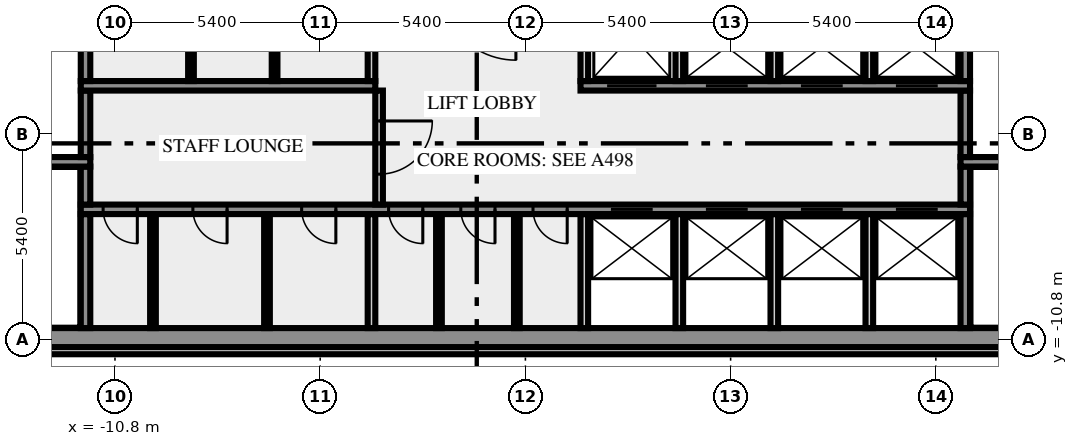
"""IFC4 building model, lengths in metres.
Left out: names, types, materials, properties, quantities, classifications, styles, units other than length and angle.
Written with IfcOpenShell. Run it as: python <this file> out.ifc"""

import sys

from ifc_helpers import new_model, si_unit, direction, frame, frame_2d, origin, place, context, subcontext, project, spatial, rectangle, extrude, element, fill, save


model = new_model("IFC4")
c1 = context("Model", 3, precision=1e-05, world=origin(), true_north=direction((0.0, 1.0)))
c2 = subcontext(c1, "Body", "Model", "MODEL_VIEW")
j1 = project(units=[si_unit("LENGTHUNIT", "METRE"), si_unit("PLANEANGLEUNIT", "RADIAN")], contexts=[c1])
p1 = place(None, origin())
s1 = spatial("IfcSite", under=j1, at=p1, CompositionType="ELEMENT")
p2 = place(p1, origin())
s2 = spatial("IfcBuilding", under=s1, at=p2, CompositionType="ELEMENT")
p3 = place(p2, frame((0.0, 0.0, 226.0)))
s3 = spatial("IfcBuildingStorey", under=s2, at=p3, CompositionType="ELEMENT", Elevation=226.0)
p4 = place(p3, frame((-17.444, -11.088, 0.0), z_axis=(0.0, 0.0, 1.0), x_axis=(1.0, 0.0, 0.0)))
e1 = element("IfcWall", 1, at=p4, inside=s3, PredefinedType="SOLIDWALL", context=c2, shape_type="SweptSolid", body=[
    extrude(rectangle(XDim=34.888, YDim=0.2, at=frame_2d((17.444, 0.0))), origin(), (0.0, 0.0, 1.0), 3.65),
])
p5 = place(p3, frame((-20.0, -10.75, 0.0), z_axis=(0.0, 0.0, 1.0), x_axis=(1.0, 0.0, 0.0)))
e2 = element("IfcWall", 2, at=p5, inside=s3, PredefinedType="SHEAR", context=c2, shape_type="SweptSolid", body=[
    extrude(rectangle(XDim=40.0, YDim=0.5, at=frame_2d((20.0, 0.0))), origin(), (0.0, 0.0, 1.0), 3.65),
])
p6 = place(p5, frame((0.8, 0.0, 1.0)))
e3 = element("IfcOpeningElement", 3, at=p6, cuts=e2, PredefinedType="OPENING", context=c2, shape_type="SweptSolid", body=[
    extrude(rectangle(XDim=1.2, YDim=1.2, at=frame_2d((0.6, 0.6))), frame((0.0, 0.26, 0.0), z_axis=(0.0, -1.0, 0.0), x_axis=(1.0, 0.0, 0.0)), (0.0, 0.0, 1.0), 0.52),
])
p7 = place(p5, frame((38.0, 0.0, 1.0)))
e4 = element("IfcOpeningElement", 4, at=p7, cuts=e2, PredefinedType="OPENING", context=c2, shape_type="SweptSolid", body=[
    extrude(rectangle(XDim=1.2, YDim=1.2, at=frame_2d((0.6, 0.6))), frame((0.0, 0.26, 0.0), z_axis=(0.0, -1.0, 0.0), x_axis=(1.0, 0.0, 0.0)), (0.0, 0.0, 1.0), 0.52),
])
p8 = place(p3, frame((-11.575, -10.5, 0.0), z_axis=(0.0, 0.0, 1.0), x_axis=(0.0, 1.0, 0.0)))
e5 = element("IfcWall", 5, at=p8, inside=s3, PredefinedType="SHEAR", context=c2, shape_type="SweptSolid", body=[
    extrude(rectangle(XDim=3.0, YDim=0.25, at=frame_2d((1.5, 0.0))), origin(), (0.0, 0.0, 1.0), 3.65),
])
for number, where, z_axis, x_axis in (
    (6, (-9.8, -10.5, 0.0), (0.0, 0.0, 1.0), (0.0, 1.0, 0.0)),
    (7, (-6.8, -10.5, 0.0), (0.0, 0.0, 1.0), (0.0, 1.0, 0.0)),
):
    element("IfcWall", number, at=place(p3, frame(where, z_axis=z_axis, x_axis=x_axis)), inside=s3, PredefinedType="PARTITIONING", context=c2, shape_type="SweptSolid", body=[
        extrude(rectangle(XDim=3.0, YDim=0.15, at=frame_2d((1.5, 0.0))), origin(), (0.0, 0.0, 1.0), 3.65),
    ])
p9 = place(p3, frame((-4.05, -10.5, 0.0), z_axis=(0.0, 0.0, 1.0), x_axis=(0.0, 1.0, 0.0)))
e8 = element("IfcWall", 8, at=p9, inside=s3, PredefinedType="SOLIDWALL", context=c2, shape_type="SweptSolid", body=[
    extrude(rectangle(XDim=3.0, YDim=0.2, at=frame_2d((1.5, 0.0))), origin(), (0.0, 0.0, 1.0), 3.65),
])
for number, where, z_axis, x_axis in (
    (9, (-2.275, -10.5, 0.0), (0.0, 0.0, 1.0), (0.0, 1.0, 0.0)),
    (10, (-0.225, -10.5, 0.0), (0.0, 0.0, 1.0), (0.0, 1.0, 0.0)),
):
    element("IfcWall", number, at=place(p3, frame(where, z_axis=z_axis, x_axis=x_axis)), inside=s3, PredefinedType="PARTITIONING", context=c2, shape_type="SweptSolid", body=[
        extrude(rectangle(XDim=3.0, YDim=0.15, at=frame_2d((1.5, 0.0))), origin(), (0.0, 0.0, 1.0), 3.65),
    ])
for number, where, z_axis, x_axis in (
    (11, (1.55, -10.5, 0.0), (0.0, 0.0, 1.0), (0.0, 1.0, 0.0)),
    (12, (4.05, -10.5, 0.0), (0.0, 0.0, 1.0), (0.0, 1.0, 0.0)),
    (13, (6.55, -10.5, 0.0), (0.0, 0.0, 1.0), (0.0, 1.0, 0.0)),
    (14, (9.05, -10.5, 0.0), (0.0, 0.0, 1.0), (0.0, 1.0, 0.0)),
):
    element("IfcWall", number, at=place(p3, frame(where, z_axis=z_axis, x_axis=x_axis)), inside=s3, PredefinedType="SOLIDWALL", context=c2, shape_type="SweptSolid", body=[
        extrude(rectangle(XDim=3.0, YDim=0.2, at=frame_2d((1.5, 0.0))), origin(), (0.0, 0.0, 1.0), 3.65),
    ])
p10 = place(p3, frame((11.575, -10.5, 0.0), z_axis=(0.0, 0.0, 1.0), x_axis=(0.0, 1.0, 0.0)))
e15 = element("IfcWall", 15, at=p10, inside=s3, PredefinedType="SHEAR", context=c2, shape_type="SweptSolid", body=[
    extrude(rectangle(XDim=3.0, YDim=0.25, at=frame_2d((1.5, 0.0))), origin(), (0.0, 0.0, 1.0), 3.65),
])
p11 = place(p3, frame((11.7, -7.375, 0.0), z_axis=(0.0, 0.0, 1.0), x_axis=(-1.0, 0.0, 0.0)))
e16 = element("IfcWall", 16, at=p11, inside=s3, PredefinedType="SHEAR", context=c2, shape_type="SweptSolid", body=[
    extrude(rectangle(XDim=23.4, YDim=0.25, at=frame_2d((11.7, 0.0))), origin(), (0.0, 0.0, 1.0), 3.65),
])
p12 = place(p11, frame((21.912, 0.0, 0.0)))
e17 = element("IfcOpeningElement", 17, at=p12, cuts=e16, PredefinedType="OPENING", context=c2, shape_type="SweptSolid", body=[
    extrude(rectangle(XDim=0.9, YDim=2.1, at=frame_2d((0.45, 1.05))), frame((0.0, 0.135, 0.0), z_axis=(0.0, -1.0, 0.0), x_axis=(1.0, 0.0, 0.0)), (0.0, 0.0, 1.0), 0.27),
])
p13 = place(p11, frame((19.55, 0.0, 0.0)))
e18 = element("IfcOpeningElement", 18, at=p13, cuts=e16, PredefinedType="OPENING", context=c2, shape_type="SweptSolid", body=[
    extrude(rectangle(XDim=0.9, YDim=2.1, at=frame_2d((0.45, 1.05))), frame((0.0, 0.135, 0.0), z_axis=(0.0, -1.0, 0.0), x_axis=(1.0, 0.0, 0.0)), (0.0, 0.0, 1.0), 0.27),
])
p14 = place(p11, frame((16.688, 0.0, 0.0)))
e19 = element("IfcOpeningElement", 19, at=p14, cuts=e16, PredefinedType="OPENING", context=c2, shape_type="SweptSolid", body=[
    extrude(rectangle(XDim=0.9, YDim=2.1, at=frame_2d((0.45, 1.05))), frame((0.0, 0.135, 0.0), z_axis=(0.0, -1.0, 0.0), x_axis=(1.0, 0.0, 0.0)), (0.0, 0.0, 1.0), 0.27),
])
p15 = place(p11, frame((14.4, 0.0, 0.0)))
e20 = element("IfcOpeningElement", 20, at=p15, cuts=e16, PredefinedType="OPENING", context=c2, shape_type="SweptSolid", body=[
    extrude(rectangle(XDim=0.9, YDim=2.1, at=frame_2d((0.45, 1.05))), frame((0.0, 0.135, 0.0), z_axis=(0.0, -1.0, 0.0), x_axis=(1.0, 0.0, 0.0)), (0.0, 0.0, 1.0), 0.27),
])
p16 = place(p11, frame((12.5, 0.0, 0.0)))
e21 = element("IfcOpeningElement", 21, at=p16, cuts=e16, PredefinedType="OPENING", context=c2, shape_type="SweptSolid", body=[
    extrude(rectangle(XDim=0.9, YDim=2.1, at=frame_2d((0.45, 1.05))), frame((0.0, 0.135, 0.0), z_axis=(0.0, -1.0, 0.0), x_axis=(1.0, 0.0, 0.0)), (0.0, 0.0, 1.0), 0.27),
])
p17 = place(p11, frame((10.6, 0.0, 0.0)))
e22 = element("IfcOpeningElement", 22, at=p17, cuts=e16, PredefinedType="OPENING", context=c2, shape_type="SweptSolid", body=[
    extrude(rectangle(XDim=0.9, YDim=2.1, at=frame_2d((0.45, 1.05))), frame((0.0, 0.135, 0.0), z_axis=(0.0, -1.0, 0.0), x_axis=(1.0, 0.0, 0.0)), (0.0, 0.0, 1.0), 0.27),
])
p18 = place(p11, frame((8.35, 0.0, 0.0)))
e23 = element("IfcOpeningElement", 23, at=p18, cuts=e16, PredefinedType="OPENING", context=c2, shape_type="SweptSolid", body=[
    extrude(rectangle(XDim=1.1, YDim=2.1, at=frame_2d((0.55, 1.05))), frame((0.0, 0.135, 0.0), z_axis=(0.0, -1.0, 0.0), x_axis=(1.0, 0.0, 0.0)), (0.0, 0.0, 1.0), 0.27),
])
p19 = place(p11, frame((5.85, 0.0, 0.0)))
e24 = element("IfcOpeningElement", 24, at=p19, cuts=e16, PredefinedType="OPENING", context=c2, shape_type="SweptSolid", body=[
    extrude(rectangle(XDim=1.1, YDim=2.1, at=frame_2d((0.55, 1.05))), frame((0.0, 0.135, 0.0), z_axis=(0.0, -1.0, 0.0), x_axis=(1.0, 0.0, 0.0)), (0.0, 0.0, 1.0), 0.27),
])
p20 = place(p11, frame((3.35, 0.0, 0.0)))
e25 = element("IfcOpeningElement", 25, at=p20, cuts=e16, PredefinedType="OPENING", context=c2, shape_type="SweptSolid", body=[
    extrude(rectangle(XDim=1.1, YDim=2.1, at=frame_2d((0.55, 1.05))), frame((0.0, 0.135, 0.0), z_axis=(0.0, -1.0, 0.0), x_axis=(1.0, 0.0, 0.0)), (0.0, 0.0, 1.0), 0.27),
])
p21 = place(p11, frame((0.85, 0.0, 0.0)))
e26 = element("IfcOpeningElement", 26, at=p21, cuts=e16, PredefinedType="OPENING", context=c2, shape_type="SweptSolid", body=[
    extrude(rectangle(XDim=1.1, YDim=2.1, at=frame_2d((0.55, 1.05))), frame((0.0, 0.135, 0.0), z_axis=(0.0, -1.0, 0.0), x_axis=(1.0, 0.0, 0.0)), (0.0, 0.0, 1.0), 0.27),
])
p22 = place(p3, frame((-11.575, -7.25, 0.0), z_axis=(0.0, 0.0, 1.0), x_axis=(0.0, 1.0, 0.0)))
e27 = element("IfcWall", 27, at=p22, inside=s3, PredefinedType="SHEAR", context=c2, shape_type="SweptSolid", body=[
    extrude(rectangle(XDim=1.0, YDim=0.25, at=frame_2d((0.5, 0.0))), origin(), (0.0, 0.0, 1.0), 3.65),
])
p23 = place(p3, frame((-3.85, -4.25, 0.0), z_axis=(0.0, 0.0, 1.0), x_axis=(0.0, -1.0, 0.0)))
e28 = element("IfcWall", 28, at=p23, inside=s3, PredefinedType="SOLIDWALL", context=c2, shape_type="SweptSolid", body=[
    extrude(rectangle(XDim=3.0, YDim=0.2, at=frame_2d((1.5, 0.0))), origin(), (0.0, 0.0, 1.0), 3.65),
])
p24 = place(p23, frame((0.8, 0.0, 0.0)))
e29 = element("IfcOpeningElement", 29, at=p24, cuts=e28, PredefinedType="OPENING", context=c2, shape_type="SweptSolid", body=[
    extrude(rectangle(XDim=1.4, YDim=2.1, at=frame_2d((0.7, 1.05))), frame((0.0, 0.11, 0.0), z_axis=(0.0, -1.0, 0.0), x_axis=(1.0, 0.0, 0.0)), (0.0, 0.0, 1.0), 0.22),
])
p25 = place(p3, frame((11.575, -7.25, 0.0), z_axis=(0.0, 0.0, 1.0), x_axis=(0.0, 1.0, 0.0)))
e30 = element("IfcWall", 30, at=p25, inside=s3, PredefinedType="SHEAR", context=c2, shape_type="SweptSolid", body=[
    extrude(rectangle(XDim=1.0, YDim=0.25, at=frame_2d((0.5, 0.0))), origin(), (0.0, 0.0, 1.0), 3.65),
])
p26 = place(p3, frame((-11.45, -6.125, 0.0), z_axis=(0.0, 0.0, 1.0), x_axis=(-1.0, 0.0, 0.0)))
e31 = element("IfcWall", 31, at=p26, inside=s3, PredefinedType="SHEAR", context=c2, shape_type="SweptSolid", body=[
    extrude(rectangle(XDim=8.05, YDim=0.25, at=frame_2d((4.025, 0.0))), origin(), (0.0, 0.0, 1.0), 3.65),
])
p27 = place(p26, frame((6.2, 0.0, 0.0)))
e32 = element("IfcOpeningElement", 32, at=p27, cuts=e31, PredefinedType="OPENING", context=c2, shape_type="SweptSolid", body=[
    extrude(rectangle(XDim=1.8, YDim=2.1, at=frame_2d((0.9, 1.05))), frame((0.0, 0.135, 0.0), z_axis=(0.0, -1.0, 0.0), x_axis=(1.0, 0.0, 0.0)), (0.0, 0.0, 1.0), 0.27),
])
p28 = place(p3, frame((19.5, -6.125, 0.0), z_axis=(0.0, 0.0, 1.0), x_axis=(-1.0, 0.0, 0.0)))
e33 = element("IfcWall", 33, at=p28, inside=s3, PredefinedType="SHEAR", context=c2, shape_type="SweptSolid", body=[
    extrude(rectangle(XDim=8.05, YDim=0.25, at=frame_2d((4.025, 0.0))), origin(), (0.0, 0.0, 1.0), 3.65),
])
p29 = place(p28, frame((0.05, 0.0, 0.0)))
e34 = element("IfcOpeningElement", 34, at=p29, cuts=e33, PredefinedType="OPENING", context=c2, shape_type="SweptSolid", body=[
    extrude(rectangle(XDim=1.8, YDim=2.1, at=frame_2d((0.9, 1.05))), frame((0.0, 0.135, 0.0), z_axis=(0.0, -1.0, 0.0), x_axis=(1.0, 0.0, 0.0)), (0.0, 0.0, 1.0), 0.27),
])
for number, where, z_axis, x_axis in (
    (35, (-11.575, -6.0, 0.0), (0.0, 0.0, 1.0), (0.0, 1.0, 0.0)),
    (36, (11.575, -6.0, 0.0), (0.0, 0.0, 1.0), (0.0, 1.0, 0.0)),
):
    element("IfcWall", number, at=place(p3, frame(where, z_axis=z_axis, x_axis=x_axis)), inside=s3, PredefinedType="SHEAR", context=c2, shape_type="SweptSolid", body=[
        extrude(rectangle(XDim=1.75, YDim=0.25, at=frame_2d((0.875, 0.0))), origin(), (0.0, 0.0, 1.0), 3.65),
    ])
p30 = place(p3, frame((-11.7, -4.125, 0.0), z_axis=(0.0, 0.0, 1.0), x_axis=(1.0, 0.0, 0.0)))
e37 = element("IfcWall", 37, at=p30, inside=s3, PredefinedType="SHEAR", context=c2, shape_type="SweptSolid", body=[
    extrude(rectangle(XDim=7.75, YDim=0.25, at=frame_2d((3.875, 0.0))), origin(), (0.0, 0.0, 1.0), 3.65),
])
p31 = place(p3, frame((1.45, -4.125, 0.0), z_axis=(0.0, 0.0, 1.0), x_axis=(1.0, 0.0, 0.0)))
e38 = element("IfcWall", 38, at=p31, inside=s3, PredefinedType="SHEAR", context=c2, shape_type="SweptSolid", body=[
    extrude(rectangle(XDim=10.25, YDim=0.25, at=frame_2d((5.125, 0.0))), origin(), (0.0, 0.0, 1.0), 3.65),
])
p32 = place(p31, frame((0.7, 0.0, 0.0)))
e39 = element("IfcOpeningElement", 39, at=p32, cuts=e38, PredefinedType="OPENING", context=c2, shape_type="SweptSolid", body=[
    extrude(rectangle(XDim=1.3, YDim=2.1, at=frame_2d((0.65, 1.05))), frame((0.0, 0.135, 0.0), z_axis=(0.0, -1.0, 0.0), x_axis=(1.0, 0.0, 0.0)), (0.0, 0.0, 1.0), 0.27),
])
p33 = place(p31, frame((3.3, 0.0, 0.0)))
e40 = element("IfcOpeningElement", 40, at=p33, cuts=e38, PredefinedType="OPENING", context=c2, shape_type="SweptSolid", body=[
    extrude(rectangle(XDim=1.1, YDim=2.1, at=frame_2d((0.55, 1.05))), frame((0.0, 0.135, 0.0), z_axis=(0.0, -1.0, 0.0), x_axis=(1.0, 0.0, 0.0)), (0.0, 0.0, 1.0), 0.27),
])
p34 = place(p31, frame((5.8, 0.0, 0.0)))
e41 = element("IfcOpeningElement", 41, at=p34, cuts=e38, PredefinedType="OPENING", context=c2, shape_type="SweptSolid", body=[
    extrude(rectangle(XDim=1.1, YDim=2.1, at=frame_2d((0.55, 1.05))), frame((0.0, 0.135, 0.0), z_axis=(0.0, -1.0, 0.0), x_axis=(1.0, 0.0, 0.0)), (0.0, 0.0, 1.0), 0.27),
])
p35 = place(p31, frame((8.3, 0.0, 0.0)))
e42 = element("IfcOpeningElement", 42, at=p35, cuts=e38, PredefinedType="OPENING", context=c2, shape_type="SweptSolid", body=[
    extrude(rectangle(XDim=1.1, YDim=2.1, at=frame_2d((0.55, 1.05))), frame((0.0, 0.135, 0.0), z_axis=(0.0, -1.0, 0.0), x_axis=(1.0, 0.0, 0.0)), (0.0, 0.0, 1.0), 0.27),
])
p36 = place(p3, frame((-11.575, -4.0, 0.0), z_axis=(0.0, 0.0, 1.0), x_axis=(0.0, 1.0, 0.0)))
e43 = element("IfcWall", 43, at=p36, inside=s3, PredefinedType="SHEAR", context=c2, shape_type="SweptSolid", body=[
    extrude(rectangle(XDim=2.3, YDim=0.25, at=frame_2d((1.15, 0.0))), origin(), (0.0, 0.0, 1.0), 3.65),
])
for number, where, z_axis, x_axis in (
    (44, (-8.8, -4.0, 0.0), (0.0, 0.0, 1.0), (0.0, 1.0, 0.0)),
    (45, (-6.6, -4.0, 0.0), (0.0, 0.0, 1.0), (0.0, 1.0, 0.0)),
):
    element("IfcWall", number, at=place(p3, frame(where, z_axis=z_axis, x_axis=x_axis)), inside=s3, PredefinedType="PARTITIONING", context=c2, shape_type="SweptSolid", body=[
        extrude(rectangle(XDim=2.3, YDim=0.15, at=frame_2d((1.15, 0.0))), origin(), (0.0, 0.0, 1.0), 3.65),
    ])
for number, where, z_axis, x_axis in (
    (46, (-4.05, -4.0, 0.0), (0.0, 0.0, 1.0), (0.0, 1.0, 0.0)),
    (47, (1.55, -4.0, 0.0), (0.0, 0.0, 1.0), (0.0, 1.0, 0.0)),
    (48, (4.05, -4.0, 0.0), (0.0, 0.0, 1.0), (0.0, 1.0, 0.0)),
    (49, (6.55, -4.0, 0.0), (0.0, 0.0, 1.0), (0.0, 1.0, 0.0)),
    (50, (9.05, -4.0, 0.0), (0.0, 0.0, 1.0), (0.0, 1.0, 0.0)),
):
    element("IfcWall", number, at=place(p3, frame(where, z_axis=z_axis, x_axis=x_axis)), inside=s3, PredefinedType="SOLIDWALL", context=c2, shape_type="SweptSolid", body=[
        extrude(rectangle(XDim=2.3, YDim=0.2, at=frame_2d((1.15, 0.0))), origin(), (0.0, 0.0, 1.0), 3.65),
    ])
p37 = place(p3, frame((11.575, -4.0, 0.0), z_axis=(0.0, 0.0, 1.0), x_axis=(0.0, 1.0, 0.0)))
e51 = element("IfcWall", 51, at=p37, inside=s3, PredefinedType="SHEAR", context=c2, shape_type="SweptSolid", body=[
    extrude(rectangle(XDim=2.3, YDim=0.25, at=frame_2d((1.15, 0.0))), origin(), (0.0, 0.0, 1.0), 3.65),
])
p38 = place(p12, origin())
e52 = element("IfcDoor", 52, at=p38, inside=s3, OperationType="SINGLE_SWING_RIGHT", PredefinedType="DOOR", context=c2, shape_type="SweptSolid", body=[
    extrude(rectangle(XDim=0.9, YDim=2.1, at=frame_2d((0.45, 1.05))), frame((0.0, 0.025, 0.0), z_axis=(0.0, -1.0, 0.0), x_axis=(1.0, 0.0, 0.0)), (0.0, 0.0, 1.0), 0.05),
])
fill(e17, e52)
p39 = place(p13, origin())
e53 = element("IfcDoor", 53, at=p39, inside=s3, OperationType="SINGLE_SWING_RIGHT", PredefinedType="DOOR", context=c2, shape_type="SweptSolid", body=[
    extrude(rectangle(XDim=0.9, YDim=2.1, at=frame_2d((0.45, 1.05))), frame((0.0, 0.025, 0.0), z_axis=(0.0, -1.0, 0.0), x_axis=(1.0, 0.0, 0.0)), (0.0, 0.0, 1.0), 0.05),
])
fill(e18, e53)
p40 = place(p14, origin())
e54 = element("IfcDoor", 54, at=p40, inside=s3, OperationType="SINGLE_SWING_RIGHT", PredefinedType="DOOR", context=c2, shape_type="SweptSolid", body=[
    extrude(rectangle(XDim=0.9, YDim=2.1, at=frame_2d((0.45, 1.05))), frame((0.0, 0.025, 0.0), z_axis=(0.0, -1.0, 0.0), x_axis=(1.0, 0.0, 0.0)), (0.0, 0.0, 1.0), 0.05),
])
fill(e19, e54)
p41 = place(p15, origin())
e55 = element("IfcDoor", 55, at=p41, inside=s3, OperationType="SINGLE_SWING_RIGHT", PredefinedType="DOOR", context=c2, shape_type="SweptSolid", body=[
    extrude(rectangle(XDim=0.9, YDim=2.1, at=frame_2d((0.45, 1.05))), frame((0.0, 0.025, 0.0), z_axis=(0.0, -1.0, 0.0), x_axis=(1.0, 0.0, 0.0)), (0.0, 0.0, 1.0), 0.05),
])
fill(e20, e55)
p42 = place(p16, origin())
e56 = element("IfcDoor", 56, at=p42, inside=s3, OperationType="SINGLE_SWING_RIGHT", PredefinedType="DOOR", context=c2, shape_type="SweptSolid", body=[
    extrude(rectangle(XDim=0.9, YDim=2.1, at=frame_2d((0.45, 1.05))), frame((0.0, 0.025, 0.0), z_axis=(0.0, -1.0, 0.0), x_axis=(1.0, 0.0, 0.0)), (0.0, 0.0, 1.0), 0.05),
])
fill(e21, e56)
p43 = place(p17, origin())
e57 = element("IfcDoor", 57, at=p43, inside=s3, OperationType="SINGLE_SWING_LEFT", PredefinedType="DOOR", context=c2, shape_type="SweptSolid", body=[
    extrude(rectangle(XDim=0.9, YDim=2.1, at=frame_2d((0.45, 1.05))), frame((0.0, 0.025, 0.0), z_axis=(0.0, -1.0, 0.0), x_axis=(1.0, 0.0, 0.0)), (0.0, 0.0, 1.0), 0.05),
])
fill(e22, e57)
p44 = place(p18, origin())
e58 = element("IfcDoor", 58, at=p44, inside=s3, OperationType="DOUBLE_DOOR_SLIDING", PredefinedType="DOOR", context=c2, shape_type="SweptSolid", body=[
    extrude(rectangle(XDim=1.1, YDim=2.1, at=frame_2d((0.55, 1.05))), frame((0.0, 0.025, 0.0), z_axis=(0.0, -1.0, 0.0), x_axis=(1.0, 0.0, 0.0)), (0.0, 0.0, 1.0), 0.05),
])
fill(e23, e58)
p45 = place(p19, origin())
e59 = element("IfcDoor", 59, at=p45, inside=s3, OperationType="DOUBLE_DOOR_SLIDING", PredefinedType="DOOR", context=c2, shape_type="SweptSolid", body=[
    extrude(rectangle(XDim=1.1, YDim=2.1, at=frame_2d((0.55, 1.05))), frame((0.0, 0.025, 0.0), z_axis=(0.0, -1.0, 0.0), x_axis=(1.0, 0.0, 0.0)), (0.0, 0.0, 1.0), 0.05),
])
fill(e24, e59)
p46 = place(p20, origin())
e60 = element("IfcDoor", 60, at=p46, inside=s3, OperationType="DOUBLE_DOOR_SLIDING", PredefinedType="DOOR", context=c2, shape_type="SweptSolid", body=[
    extrude(rectangle(XDim=1.1, YDim=2.1, at=frame_2d((0.55, 1.05))), frame((0.0, 0.025, 0.0), z_axis=(0.0, -1.0, 0.0), x_axis=(1.0, 0.0, 0.0)), (0.0, 0.0, 1.0), 0.05),
])
fill(e25, e60)
p47 = place(p21, origin())
e61 = element("IfcDoor", 61, at=p47, inside=s3, OperationType="DOUBLE_DOOR_SLIDING", PredefinedType="DOOR", context=c2, shape_type="SweptSolid", body=[
    extrude(rectangle(XDim=1.1, YDim=2.1, at=frame_2d((0.55, 1.05))), frame((0.0, 0.025, 0.0), z_axis=(0.0, -1.0, 0.0), x_axis=(1.0, 0.0, 0.0)), (0.0, 0.0, 1.0), 0.05),
])
fill(e26, e61)
p48 = place(p24, origin())
e62 = element("IfcDoor", 62, at=p48, inside=s3, OperationType="DOUBLE_DOOR_SINGLE_SWING", PredefinedType="DOOR", context=c2, shape_type="SweptSolid", body=[
    extrude(rectangle(XDim=1.4, YDim=2.1, at=frame_2d((0.7, 1.05))), frame((0.0, 0.025, 0.0), z_axis=(0.0, -1.0, 0.0), x_axis=(1.0, 0.0, 0.0)), (0.0, 0.0, 1.0), 0.05),
])
fill(e29, e62)
p49 = place(p32, origin())
e63 = element("IfcDoor", 63, at=p49, inside=s3, OperationType="DOUBLE_DOOR_SLIDING", PredefinedType="DOOR", context=c2, shape_type="SweptSolid", body=[
    extrude(rectangle(XDim=1.3, YDim=2.1, at=frame_2d((0.65, 1.05))), frame((0.0, 0.025, 0.0), z_axis=(0.0, -1.0, 0.0), x_axis=(1.0, 0.0, 0.0)), (0.0, 0.0, 1.0), 0.05),
])
fill(e39, e63)
p50 = place(p33, origin())
e64 = element("IfcDoor", 64, at=p50, inside=s3, OperationType="DOUBLE_DOOR_SLIDING", PredefinedType="DOOR", context=c2, shape_type="SweptSolid", body=[
    extrude(rectangle(XDim=1.1, YDim=2.1, at=frame_2d((0.55, 1.05))), frame((0.0, 0.025, 0.0), z_axis=(0.0, -1.0, 0.0), x_axis=(1.0, 0.0, 0.0)), (0.0, 0.0, 1.0), 0.05),
])
fill(e40, e64)
p51 = place(p34, origin())
e65 = element("IfcDoor", 65, at=p51, inside=s3, OperationType="DOUBLE_DOOR_SLIDING", PredefinedType="DOOR", context=c2, shape_type="SweptSolid", body=[
    extrude(rectangle(XDim=1.1, YDim=2.1, at=frame_2d((0.55, 1.05))), frame((0.0, 0.025, 0.0), z_axis=(0.0, -1.0, 0.0), x_axis=(1.0, 0.0, 0.0)), (0.0, 0.0, 1.0), 0.05),
])
fill(e41, e65)
p52 = place(p35, origin())
e66 = element("IfcDoor", 66, at=p52, inside=s3, OperationType="DOUBLE_DOOR_SLIDING", PredefinedType="DOOR", context=c2, shape_type="SweptSolid", body=[
    extrude(rectangle(XDim=1.1, YDim=2.1, at=frame_2d((0.55, 1.05))), frame((0.0, 0.025, 0.0), z_axis=(0.0, -1.0, 0.0), x_axis=(1.0, 0.0, 0.0)), (0.0, 0.0, 1.0), 0.05),
])
fill(e42, e66)
save(model, sys.argv[1])
